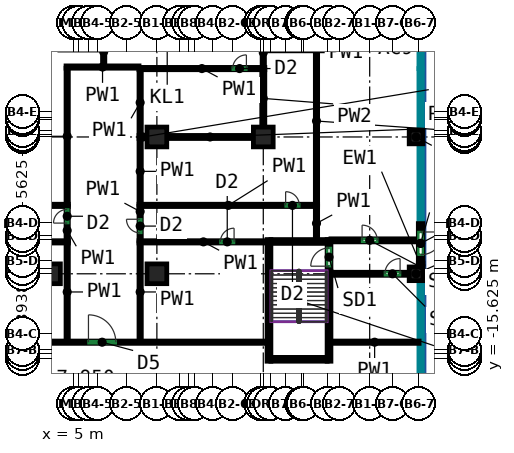
"""IFC4 building model, lengths in metres.
Left out: names, types, materials, properties, quantities, classifications, styles, units other than length and angle.
Written with IfcOpenShell. Run it as: python <this file> out.ifc"""

import sys

from ifc_helpers import new_model, si_unit, direction, frame, frame_2d, origin, origin_2d, place, context, subcontext, project, spatial, rectangle, extrude, source, transform, mapped, element, fill, save


model = new_model("IFC4")
c1 = context("Model", 3, precision=1e-05, world=origin(), true_north=direction((0.0, 1.0)))
c2 = subcontext(c1, "Body", "Model", "MODEL_VIEW")
j1 = project(units=[si_unit("LENGTHUNIT", "METRE"), si_unit("PLANEANGLEUNIT", "RADIAN")], contexts=[c1])
p1 = place(None, origin())
s1 = spatial("IfcSite", under=j1, at=p1, CompositionType="ELEMENT")
p2 = place(p1, origin())
s2 = spatial("IfcBuilding", under=s1, at=p2, CompositionType="ELEMENT")
p3 = place(p2, origin())
s3 = spatial("IfcBuildingStorey", under=s2, at=p3, CompositionType="ELEMENT", Elevation=0.0)
m1 = source(origin(), c2, "Body", "SweptSolid", [
    extrude(rectangle(XDim=1.3, YDim=1.3, at=origin_2d()), origin(), (0.0, 0.0, 1.0), 8.6),
])
for number, where, z_axis, x_axis in (
    (1, (3.5, -10.0, 0.0), (0.0, 0.0, 1.0), (1.0, 0.0, 0.0)),
    (2, (10.5, -10.0, 0.0), (0.0, 0.0, 1.0), (1.0, 0.0, 0.0)),
    (3, (10.5, -1.0, 0.0), (0.0, 0.0, 1.0), (1.0, 0.0, 0.0)),
    (4, (17.5, -1.0, 0.0), (0.0, 0.0, 1.0), (1.0, 0.0, 0.0)),
):
    element("IfcColumn", number, at=place(p3, frame(where, z_axis=z_axis, x_axis=x_axis)), inside=s3, PredefinedType="COLUMN", context=c2, shape_type="MappedRepresentation", body=[
        mapped(m1, transform((0.0, 0.0, 0.0))),
    ])
m2 = source(origin(), c2, "Body", "SweptSolid", [
    extrude(rectangle(XDim=0.9, YDim=0.9, at=origin_2d()), origin(), (0.0, 0.0, 1.0), 8.6),
])
for number, where, z_axis, x_axis in (
    (5, (27.55, -10.0, 0.0), (0.0, 0.0, 1.0), (1.0, 0.0, 0.0)),
    (6, (27.55, -1.0, 0.0), (0.0, 0.0, 1.0), (1.0, 0.0, 0.0)),
):
    element("IfcColumn", number, at=place(p3, frame(where, z_axis=z_axis, x_axis=x_axis)), inside=s3, PredefinedType="COLUMN", context=c2, shape_type="MappedRepresentation", body=[
        mapped(m2, transform((0.0, 0.0, 0.0))),
    ])
m3 = source(origin(), c2, "Body", "SweptSolid", [
    extrude(rectangle(XDim=8.0, YDim=0.25, at=frame_2d((4.0, 0.0))), origin(), (0.0, 0.0, 1.0), 8.6),
])
p4 = place(p3, frame((17.875, -15.75, 0.0), z_axis=(0.0, 0.0, 1.0), x_axis=(0.0, 1.0, 0.0)))
e7 = element("IfcWall", 7, at=p4, inside=s3, PredefinedType="SHEAR", context=c2, shape_type="MappedRepresentation", body=[
    mapped(m3, transform((0.0, 0.0, 0.0))),
])
p5 = place(p3, frame((21.825, -15.75, 0.0), z_axis=(0.0, 0.0, 1.0), x_axis=(0.0, 1.0, 0.0)))
e8 = element("IfcWall", 8, at=p5, inside=s3, PredefinedType="SHEAR", context=c2, shape_type="MappedRepresentation", body=[
    mapped(m3, transform((0.0, 0.0, 0.0))),
])
p6 = place(p5, frame((6.25, 0.0, 0.0)))
e9 = element("IfcOpeningElement", 9, at=p6, cuts=e8, PredefinedType="OPENING", context=c2, shape_type="SweptSolid", body=[
    extrude(rectangle(XDim=1.2, YDim=2.1, at=frame_2d((0.6, 1.05))), frame((0.0, 0.135, 0.0), z_axis=(0.0, -1.0, 0.0), x_axis=(1.0, 0.0, 0.0)), (0.0, 0.0, 1.0), 0.27),
])
m4 = source(origin(), c2, "Body", "SweptSolid", [
    extrude(rectangle(XDim=3.7, YDim=0.25, at=frame_2d((1.85, 0.0))), origin(), (0.0, 0.0, 1.0), 8.6),
])
for number, where, z_axis, x_axis in (
    (10, (18.0, -15.625, 0.0), (0.0, 0.0, 1.0), (1.0, 0.0, 0.0)),
    (11, (18.0, -7.875, 0.0), (0.0, 0.0, 1.0), (1.0, 0.0, 0.0)),
):
    element("IfcWall", number, at=place(p3, frame(where, z_axis=z_axis, x_axis=x_axis)), inside=s3, PredefinedType="SHEAR", context=c2, shape_type="MappedRepresentation", body=[
        mapped(m4, transform((0.0, 0.0, 0.0))),
    ])
m5 = source(origin(), c2, "Body", "SweptSolid", [
    extrude(rectangle(XDim=5.75, YDim=0.2, at=frame_2d((2.875, 0.0))), origin(), (0.0, 0.0, 1.0), 8.6),
])
p7 = place(p3, frame((21.95, -10.0, 0.0), z_axis=(0.0, 0.0, 1.0), x_axis=(1.0, 0.0, 0.0)))
e12 = element("IfcWall", 12, at=p7, inside=s3, PredefinedType="SHEAR", context=c2, shape_type="MappedRepresentation", body=[
    mapped(m5, transform((0.0, 0.0, 0.0))),
])
p8 = place(p7, frame((3.55, 0.0, 0.0)))
e13 = element("IfcOpeningElement", 13, at=p8, cuts=e12, PredefinedType="OPENING", context=c2, shape_type="SweptSolid", body=[
    extrude(rectangle(XDim=1.0, YDim=2.1, at=frame_2d((0.5, 1.05))), frame((0.0, 0.11, 0.0), z_axis=(0.0, -1.0, 0.0), x_axis=(1.0, 0.0, 0.0)), (0.0, 0.0, 1.0), 0.22),
])
p9 = place(p3, frame((21.95, -7.8, 0.0), z_axis=(0.0, 0.0, 1.0), x_axis=(1.0, 0.0, 0.0)))
e14 = element("IfcWall", 14, at=p9, inside=s3, PredefinedType="SHEAR", context=c2, shape_type="MappedRepresentation", body=[
    mapped(m5, transform((0.0, 0.0, 0.0))),
])
p10 = place(p9, frame((2.05, 0.0, 0.0)))
e15 = element("IfcOpeningElement", 15, at=p10, cuts=e14, PredefinedType="OPENING", context=c2, shape_type="SweptSolid", body=[
    extrude(rectangle(XDim=1.0, YDim=2.1, at=frame_2d((0.5, 1.05))), frame((0.0, 0.11, 0.0), z_axis=(0.0, -1.0, 0.0), x_axis=(1.0, 0.0, 0.0)), (0.0, 0.0, 1.0), 0.22),
])
m6 = source(origin(), c2, "Body", "SweptSolid", [
    extrude(rectangle(XDim=0.25, YDim=0.3, at=frame_2d((0.125, 0.0))), origin(), (0.0, 0.0, 1.0), 8.6),
])
p11 = place(p3, frame((27.85, -9.55, 0.0), z_axis=(0.0, 0.0, 1.0), x_axis=(0.0, 1.0, 0.0)))
e16 = element("IfcWall", 16, at=p11, inside=s3, PredefinedType="SOLIDWALL", context=c2, shape_type="MappedRepresentation", body=[
    mapped(m6, transform((0.0, 0.0, 0.0))),
])
m7 = source(origin(), c2, "Body", "SweptSolid", [
    extrude(rectangle(XDim=2.6, YDim=0.3, at=frame_2d((1.3, 0.0))), origin(), (0.0, 0.0, 1.0), 8.6),
])
p12 = place(p3, frame((27.85, -6.7, 0.0), z_axis=(0.0, 0.0, 1.0), x_axis=(0.0, -1.0, 0.0)))
e17 = element("IfcWall", 17, at=p12, inside=s3, PredefinedType="SOLIDWALL", context=c2, shape_type="MappedRepresentation", body=[
    mapped(m7, transform((0.0, 0.0, 0.0))),
])
p13 = place(p12, frame((0.55, 0.0, 0.0)))
e18 = element("IfcOpeningElement", 18, at=p13, cuts=e17, PredefinedType="OPENING", context=c2, shape_type="SweptSolid", body=[
    extrude(rectangle(XDim=1.5, YDim=2.4, at=frame_2d((0.75, 1.2))), frame((0.0, 0.16, 0.0), z_axis=(0.0, -1.0, 0.0), x_axis=(1.0, 0.0, 0.0)), (0.0, 0.0, 1.0), 0.32),
])
p14 = place(p3, frame((21.9, -14.5, 0.0), z_axis=(0.0, 0.0, 1.0), x_axis=(1.0, 0.0, 0.0)))
e19 = element("IfcWall", 19, at=p14, inside=s3, PredefinedType="PARTITIONING", context=c2, shape_type="SweptSolid", body=[
    extrude(rectangle(XDim=5.85, YDim=0.15, at=frame_2d((2.925, 0.0))), origin(), (0.0, 0.0, 1.0), 8.6),
])
p15 = place(p3, frame((-13.6, -14.5, 0.0), z_axis=(0.0, 0.0, 1.0), x_axis=(1.0, 0.0, 0.0)))
e20 = element("IfcWall", 20, at=p15, inside=s3, PredefinedType="PARTITIONING", context=c2, shape_type="SweptSolid", body=[
    extrude(rectangle(XDim=31.4, YDim=0.15, at=frame_2d((15.7, 0.0))), origin(), (0.0, 0.0, 1.0), 8.6),
])
p16 = place(p15, frame((19.599, 0.0, 0.0)))
e21 = element("IfcOpeningElement", 21, at=p16, cuts=e20, PredefinedType="OPENING", context=c2, shape_type="SweptSolid", body=[
    extrude(rectangle(XDim=1.8, YDim=2.1, at=frame_2d((0.9, 1.05))), frame((0.0, 0.085, 0.0), z_axis=(0.0, -1.0, 0.0), x_axis=(1.0, 0.0, 0.0)), (0.0, 0.0, 1.0), 0.17),
])
p17 = place(p3, frame((21.0, -7.8, 0.0), z_axis=(0.0, 0.0, 1.0), x_axis=(0.0, 1.0, 0.0)))
e22 = element("IfcWall", 22, at=p17, inside=s3, PredefinedType="PARTITIONING", context=c2, shape_type="SweptSolid", body=[
    extrude(rectangle(XDim=2.235, YDim=0.15, at=frame_2d((1.118, 0.0))), origin(), (0.0, 0.0, 1.0), 8.6),
])
p18 = place(p3, frame((21.0, -5.434, 0.0), z_axis=(0.0, 0.0, 1.0), x_axis=(0.0, 1.0, 0.0)))
e23 = element("IfcWall", 23, at=p18, inside=s3, PredefinedType="PARTITIONING", context=c2, shape_type="SweptSolid", body=[
    extrude(rectangle(XDim=10.968, YDim=0.15, at=frame_2d((5.484, 0.0))), origin(), (0.0, 0.0, 1.0), 8.6),
])
p19 = place(p3, frame((4.6, -7.835, 0.0), z_axis=(0.0, 0.0, 1.0), x_axis=(0.0, 1.0, 0.0)))
e24 = element("IfcWall", 24, at=p19, inside=s3, PredefinedType="PARTITIONING", context=c2, shape_type="SweptSolid", body=[
    extrude(rectangle(XDim=2.27, YDim=0.15, at=frame_2d((1.135, 0.0))), origin(), (0.0, 0.0, 1.0), 8.6),
])
p20 = place(p19, frame((1.17, 0.0, 0.0)))
e25 = element("IfcOpeningElement", 25, at=p20, cuts=e24, PredefinedType="OPENING", context=c2, shape_type="SweptSolid", body=[
    extrude(rectangle(XDim=0.9, YDim=2.1, at=frame_2d((0.45, 1.05))), frame((0.0, 0.085, 0.0), z_axis=(0.0, -1.0, 0.0), x_axis=(1.0, 0.0, 0.0)), (0.0, 0.0, 1.0), 0.17),
])
p21 = place(p3, frame((9.4, -7.835, 0.0), z_axis=(0.0, 0.0, 1.0), x_axis=(0.0, 1.0, 0.0)))
e26 = element("IfcWall", 26, at=p21, inside=s3, PredefinedType="PARTITIONING", context=c2, shape_type="SweptSolid", body=[
    extrude(rectangle(XDim=2.27, YDim=0.15, at=frame_2d((1.135, 0.0))), origin(), (0.0, 0.0, 1.0), 8.6),
])
p22 = place(p21, frame((0.523, 0.0, 0.0)))
e27 = element("IfcOpeningElement", 27, at=p22, cuts=e26, PredefinedType="OPENING", context=c2, shape_type="SweptSolid", body=[
    extrude(rectangle(XDim=0.9, YDim=2.1, at=frame_2d((0.45, 1.05))), frame((0.0, 0.085, 0.0), z_axis=(0.0, -1.0, 0.0), x_axis=(1.0, 0.0, 0.0)), (0.0, 0.0, 1.0), 0.17),
])
p23 = place(p3, frame((4.6, -14.425, 0.0), z_axis=(0.0, 0.0, 1.0), x_axis=(0.0, 1.0, 0.0)))
e28 = element("IfcWall", 28, at=p23, inside=s3, PredefinedType="PARTITIONING", context=c2, shape_type="SweptSolid", body=[
    extrude(rectangle(XDim=6.459, YDim=0.15, at=frame_2d((3.229, 0.0))), origin(), (0.0, 0.0, 1.0), 8.6),
])
p24 = place(p3, frame((4.6, -5.434, 0.0), z_axis=(0.0, 0.0, 1.0), x_axis=(0.0, 1.0, 0.0)))
e29 = element("IfcWall", 29, at=p24, inside=s3, PredefinedType="PARTITIONING", context=c2, shape_type="SweptSolid", body=[
    extrude(rectangle(XDim=8.959, YDim=0.15, at=frame_2d((4.479, 0.0))), origin(), (0.0, 0.0, 1.0), 8.6),
])
p25 = place(p3, frame((4.525, 3.6, 0.0), z_axis=(0.0, 0.0, 1.0), x_axis=(1.0, 0.0, 0.0)))
e30 = element("IfcWall", 30, at=p25, inside=s3, PredefinedType="PARTITIONING", context=c2, shape_type="SweptSolid", body=[
    extrude(rectangle(XDim=4.8, YDim=0.15, at=frame_2d((2.4, 0.0))), origin(), (0.0, 0.0, 1.0), 8.6),
])
for number, where, z_axis, x_axis in (
    (31, (9.4, -0.91, 0.0), (0.0, 0.0, 1.0), (0.0, 1.0, 0.0)),
    (32, (9.4, -5.434, 0.0), (0.0, 0.0, 1.0), (0.0, 1.0, 0.0)),
):
    element("IfcWall", number, at=place(p3, frame(where, z_axis=z_axis, x_axis=x_axis)), inside=s3, PredefinedType="PARTITIONING", context=c2, shape_type="SweptSolid", body=[
        extrude(rectangle(XDim=4.344, YDim=0.15, at=frame_2d((2.172, 0.0))), origin(), (0.0, 0.0, 1.0), 8.6),
    ])
p26 = place(p3, frame((9.4, -14.425, 0.0), z_axis=(0.0, 0.0, 1.0), x_axis=(0.0, 1.0, 0.0)))
e33 = element("IfcWall", 33, at=p26, inside=s3, PredefinedType="PARTITIONING", context=c2, shape_type="SweptSolid", body=[
    extrude(rectangle(XDim=6.459, YDim=0.15, at=frame_2d((3.229, 0.0))), origin(), (0.0, 0.0, 1.0), 8.6),
])
p27 = place(p3, frame((-17.075, -5.5, 0.0), z_axis=(0.0, 0.0, 1.0), x_axis=(1.0, 0.0, 0.0)))
e34 = element("IfcWall", 34, at=p27, inside=s3, PredefinedType="PARTITIONING", context=c2, shape_type="SweptSolid", body=[
    extrude(rectangle(XDim=21.75, YDim=0.15, at=frame_2d((10.875, 0.0))), origin(), (0.0, 0.0, 1.0), 8.6),
])
p28 = place(p3, frame((-13.6, -7.9, 0.0), z_axis=(0.0, 0.0, 1.0), x_axis=(1.0, 0.0, 0.0)))
e35 = element("IfcWall", 35, at=p28, inside=s3, PredefinedType="PARTITIONING", context=c2, shape_type="SweptSolid", body=[
    extrude(rectangle(XDim=18.275, YDim=0.15, at=frame_2d((9.138, 0.0))), origin(), (0.0, 0.0, 1.0), 8.6),
])
p29 = place(p28, frame((10.85, 0.0, 0.0)))
e36 = element("IfcOpeningElement", 36, at=p29, cuts=e35, PredefinedType="OPENING", context=c2, shape_type="SweptSolid", body=[
    extrude(rectangle(XDim=1.8, YDim=2.1, at=frame_2d((0.9, 1.05))), frame((0.0, 0.085, 0.0), z_axis=(0.0, -1.0, 0.0), x_axis=(1.0, 0.0, 0.0)), (0.0, 0.0, 1.0), 0.17),
])
p30 = place(p3, frame((9.325, -5.5, 0.0), z_axis=(0.0, 0.0, 1.0), x_axis=(1.0, 0.0, 0.0)))
e37 = element("IfcWall", 37, at=p30, inside=s3, PredefinedType="PARTITIONING", context=c2, shape_type="SweptSolid", body=[
    extrude(rectangle(XDim=11.75, YDim=0.15, at=frame_2d((5.875, 0.0))), origin(), (0.0, 0.0, 1.0), 8.6),
])
p31 = place(p30, frame((9.645, 0.0, 0.0)))
e38 = element("IfcOpeningElement", 38, at=p31, cuts=e37, PredefinedType="OPENING", context=c2, shape_type="SweptSolid", body=[
    extrude(rectangle(XDim=0.9, YDim=2.1, at=frame_2d((0.45, 1.05))), frame((0.0, 0.085, 0.0), z_axis=(0.0, -1.0, 0.0), x_axis=(1.0, 0.0, 0.0)), (0.0, 0.0, 1.0), 0.17),
])
p32 = place(p3, frame((9.325, -7.9, 0.0), z_axis=(0.0, 0.0, 1.0), x_axis=(1.0, 0.0, 0.0)))
e39 = element("IfcWall", 39, at=p32, inside=s3, PredefinedType="PARTITIONING", context=c2, shape_type="SweptSolid", body=[
    extrude(rectangle(XDim=8.475, YDim=0.15, at=frame_2d((4.238, 0.0))), origin(), (0.0, 0.0, 1.0), 8.6),
])
p33 = place(p32, frame((5.354, 0.0, 0.0)))
e40 = element("IfcOpeningElement", 40, at=p33, cuts=e39, PredefinedType="OPENING", context=c2, shape_type="SweptSolid", body=[
    extrude(rectangle(XDim=0.9, YDim=2.1, at=frame_2d((0.45, 1.05))), frame((0.0, 0.085, 0.0), z_axis=(0.0, -1.0, 0.0), x_axis=(1.0, 0.0, 0.0)), (0.0, 0.0, 1.0), 0.17),
])
p34 = place(p3, frame((7.0, 5.525, 0.0), z_axis=(0.0, 0.0, 1.0), x_axis=(0.0, -1.0, 0.0)))
e41 = element("IfcWall", 41, at=p34, inside=s3, PredefinedType="PARTITIONING", context=c2, shape_type="SweptSolid", body=[
    extrude(rectangle(XDim=1.85, YDim=0.15, at=frame_2d((0.925, 0.0))), origin(), (0.0, 0.0, 1.0), 8.6),
])
p35 = place(p3, frame((9.325, 3.5, 0.0), z_axis=(0.0, 0.0, 1.0), x_axis=(1.0, 0.0, 0.0)))
e42 = element("IfcWall", 42, at=p35, inside=s3, PredefinedType="PARTITIONING", context=c2, shape_type="SweptSolid", body=[
    extrude(rectangle(XDim=8.275, YDim=0.15, at=frame_2d((4.138, 0.0))), origin(), (0.0, 0.0, 1.0), 8.6),
])
p36 = place(p35, frame((6.164, 0.0, 0.0)))
e43 = element("IfcOpeningElement", 43, at=p36, cuts=e42, PredefinedType="OPENING", context=c2, shape_type="SweptSolid", body=[
    extrude(rectangle(XDim=0.9, YDim=2.1, at=frame_2d((0.45, 1.05))), frame((0.0, 0.085, 0.0), z_axis=(0.0, -1.0, 0.0), x_axis=(1.0, 0.0, 0.0)), (0.0, 0.0, 1.0), 0.17),
])
p37 = place(p3, frame((17.5, 3.575, 0.0), z_axis=(0.0, 0.0, 1.0), x_axis=(0.0, 1.0, 0.0)))
e44 = element("IfcWall", 44, at=p37, inside=s3, PredefinedType="PARTITIONING", context=c2, shape_type="SweptSolid", body=[
    extrude(rectangle(XDim=1.95, YDim=0.15, at=frame_2d((0.975, 0.0))), origin(), (0.0, 0.0, 1.0), 8.6),
])
p38 = place(p3, frame((11.15, -1.0, 0.0), z_axis=(0.0, 0.0, 1.0), x_axis=(1.0, 0.0, 0.0)))
e45 = element("IfcWall", 45, at=p38, inside=s3, PredefinedType="PARTITIONING", context=c2, shape_type="SweptSolid", body=[
    extrude(rectangle(XDim=5.7, YDim=0.2, at=frame_2d((2.85, 0.0))), origin(), (0.0, 0.0, 1.0), 7.95),
])
p39 = place(p3, frame((9.326, -1.0, 0.0), z_axis=(0.0, 0.0, 1.0), x_axis=(1.0, 0.0, 0.0)))
e46 = element("IfcWall", 46, at=p39, inside=s3, PredefinedType="PARTITIONING", context=c2, shape_type="SweptSolid", body=[
    extrude(rectangle(XDim=0.524, YDim=0.2, at=frame_2d((0.262, 0.0))), origin(), (0.0, 0.0, 1.0), 7.95),
])
p40 = place(p3, frame((17.5, -0.35, 0.0), z_axis=(0.0, 0.0, 1.0), x_axis=(0.0, 1.0, 0.0)))
e47 = element("IfcWall", 47, at=p40, inside=s3, PredefinedType="PARTITIONING", context=c2, shape_type="SweptSolid", body=[
    extrude(rectangle(XDim=3.774, YDim=0.2, at=frame_2d((1.887, 0.0))), origin(), (0.0, 0.0, 1.0), 8.6),
])
p41 = place(p13, origin())
e48 = element("IfcDoor", 48, at=p41, inside=s3, OperationType="DOUBLE_DOOR_SINGLE_SWING", PredefinedType="DOOR", context=c2, shape_type="SweptSolid", body=[
    extrude(rectangle(XDim=1.5, YDim=2.4, at=frame_2d((0.75, 1.2))), frame((0.0, 0.025, 0.0), z_axis=(0.0, -1.0, 0.0), x_axis=(1.0, 0.0, 0.0)), (0.0, 0.0, 1.0), 0.05),
])
fill(e18, e48)
p42 = place(p6, origin())
e49 = element("IfcDoor", 49, at=p42, inside=s3, OperationType="DOUBLE_DOOR_SINGLE_SWING", PredefinedType="DOOR", context=c2, shape_type="SweptSolid", body=[
    extrude(rectangle(XDim=1.2, YDim=2.1, at=frame_2d((0.6, 1.05))), frame((0.0, 0.025, 0.0), z_axis=(0.0, -1.0, 0.0), x_axis=(1.0, 0.0, 0.0)), (0.0, 0.0, 1.0), 0.05),
])
fill(e9, e49)
p43 = place(p10, origin())
e50 = element("IfcDoor", 50, at=p43, inside=s3, OperationType="SINGLE_SWING_LEFT", PredefinedType="DOOR", context=c2, shape_type="SweptSolid", body=[
    extrude(rectangle(XDim=1.0, YDim=2.1, at=frame_2d((0.5, 1.05))), frame((0.0, 0.025, 0.0), z_axis=(0.0, -1.0, 0.0), x_axis=(1.0, 0.0, 0.0)), (0.0, 0.0, 1.0), 0.05),
])
fill(e15, e50)
p44 = place(p8, origin())
e51 = element("IfcDoor", 51, at=p44, inside=s3, OperationType="SINGLE_SWING_RIGHT", PredefinedType="DOOR", context=c2, shape_type="SweptSolid", body=[
    extrude(rectangle(XDim=1.0, YDim=2.1, at=frame_2d((0.5, 1.05))), frame((0.0, 0.025, 0.0), z_axis=(0.0, -1.0, 0.0), x_axis=(1.0, 0.0, 0.0)), (0.0, 0.0, 1.0), 0.05),
])
fill(e13, e51)
p45 = place(p16, origin())
e52 = element("IfcDoor", 52, at=p45, inside=s3, OperationType="DOUBLE_DOOR_SINGLE_SWING", PredefinedType="DOOR", context=c2, shape_type="SweptSolid", body=[
    extrude(rectangle(XDim=1.8, YDim=2.1, at=frame_2d((0.9, 1.05))), frame((0.0, 0.025, 0.0), z_axis=(0.0, -1.0, 0.0), x_axis=(1.0, 0.0, 0.0)), (0.0, 0.0, 1.0), 0.05),
])
fill(e21, e52)
p46 = place(p33, origin())
e53 = element("IfcDoor", 53, at=p46, inside=s3, OperationType="SINGLE_SWING_RIGHT", PredefinedType="DOOR", context=c2, shape_type="SweptSolid", body=[
    extrude(rectangle(XDim=0.9, YDim=2.1, at=frame_2d((0.45, 1.05))), frame((0.0, 0.025, 0.0), z_axis=(0.0, -1.0, 0.0), x_axis=(1.0, 0.0, 0.0)), (0.0, 0.0, 1.0), 0.05),
])
fill(e40, e53)
p47 = place(p22, origin())
e54 = element("IfcDoor", 54, at=p47, inside=s3, OperationType="SINGLE_SWING_RIGHT", PredefinedType="DOOR", context=c2, shape_type="SweptSolid", body=[
    extrude(rectangle(XDim=0.9, YDim=2.1, at=frame_2d((0.45, 1.05))), frame((0.0, 0.025, 0.0), z_axis=(0.0, -1.0, 0.0), x_axis=(1.0, 0.0, 0.0)), (0.0, 0.0, 1.0), 0.05),
])
fill(e27, e54)
p48 = place(p20, origin())
e55 = element("IfcDoor", 55, at=p48, inside=s3, OperationType="SINGLE_SWING_LEFT", PredefinedType="DOOR", context=c2, shape_type="SweptSolid", body=[
    extrude(rectangle(XDim=0.9, YDim=2.1, at=frame_2d((0.45, 1.05))), frame((0.0, 0.025, 0.0), z_axis=(0.0, -1.0, 0.0), x_axis=(1.0, 0.0, 0.0)), (0.0, 0.0, 1.0), 0.05),
])
fill(e25, e55)
p49 = place(p31, origin())
e56 = element("IfcDoor", 56, at=p49, inside=s3, OperationType="SINGLE_SWING_LEFT", PredefinedType="DOOR", context=c2, shape_type="SweptSolid", body=[
    extrude(rectangle(XDim=0.9, YDim=2.1, at=frame_2d((0.45, 1.05))), frame((0.0, 0.025, 0.0), z_axis=(0.0, -1.0, 0.0), x_axis=(1.0, 0.0, 0.0)), (0.0, 0.0, 1.0), 0.05),
])
fill(e38, e56)
p50 = place(p36, origin())
e57 = element("IfcDoor", 57, at=p50, inside=s3, OperationType="SINGLE_SWING_RIGHT", PredefinedType="DOOR", context=c2, shape_type="SweptSolid", body=[
    extrude(rectangle(XDim=0.9, YDim=2.1, at=frame_2d((0.45, 1.05))), frame((0.0, 0.025, 0.0), z_axis=(0.0, -1.0, 0.0), x_axis=(1.0, 0.0, 0.0)), (0.0, 0.0, 1.0), 0.05),
])
fill(e43, e57)
save(model, sys.argv[1])
